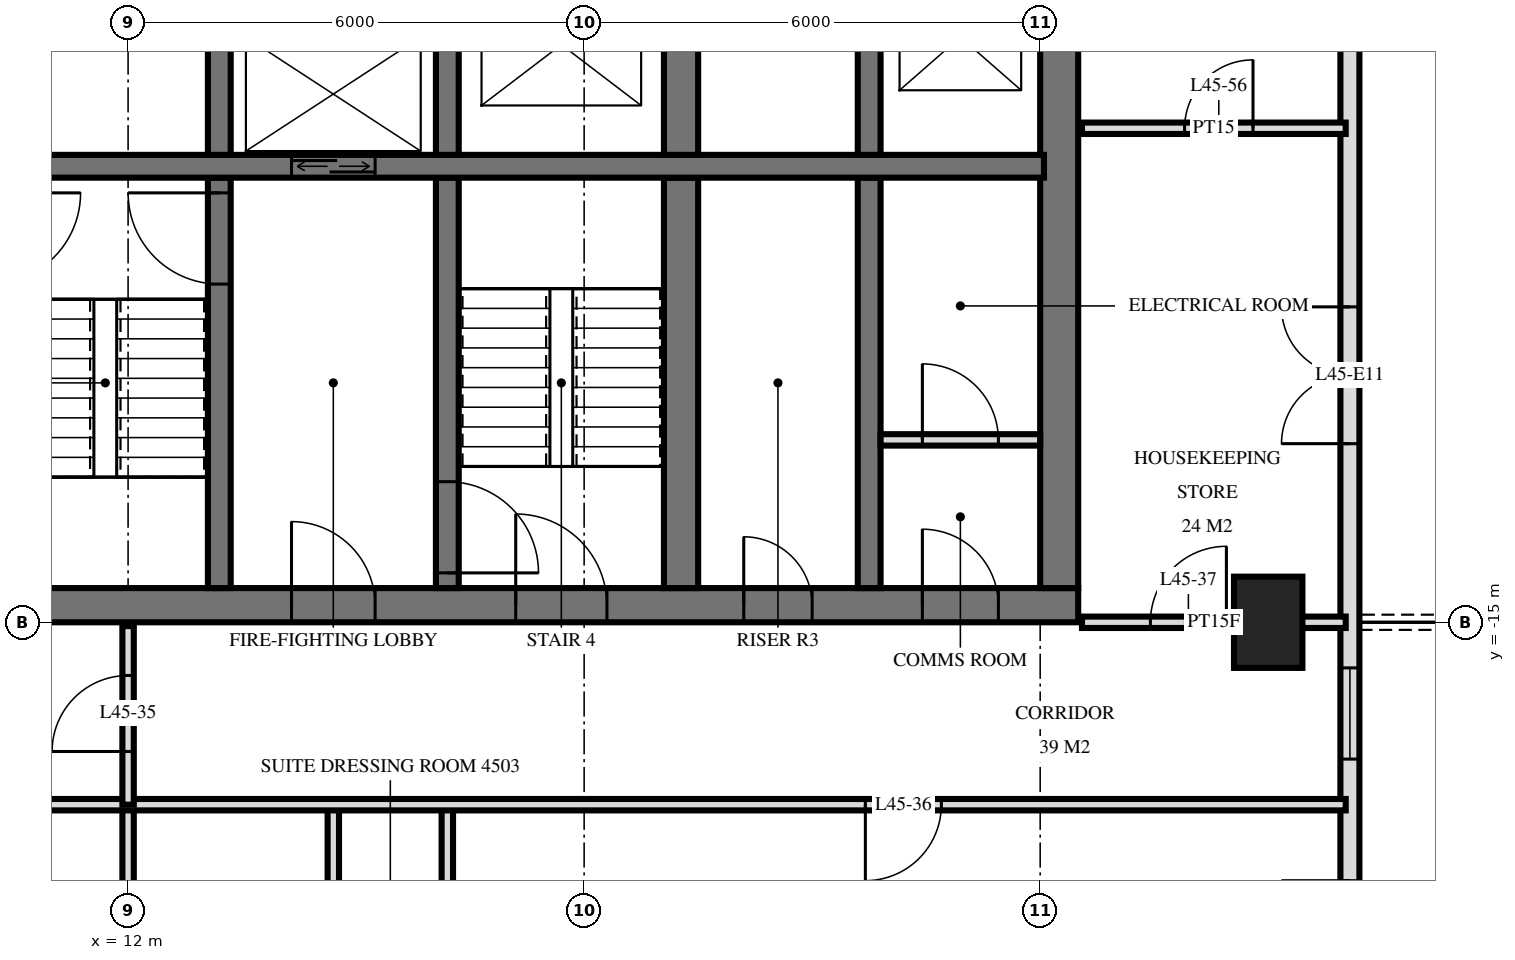
"""IFC4 building model, lengths in metres.
Left out: names, types, materials, properties, quantities, classifications, styles, units other than length and angle.
Written with IfcOpenShell. Run it as: python <this file> out.ifc"""

import sys

from ifc_helpers import new_model, si_unit, direction, frame, frame_2d, origin, origin_2d, place, context, subcontext, project, spatial, rectangle, extrude, element, fill, save


model = new_model("IFC4")
c1 = context("Model", 3, precision=1e-05, world=origin(), true_north=direction((0.0, 1.0)))
c2 = subcontext(c1, "Body", "Model", "MODEL_VIEW")
j1 = project(units=[si_unit("LENGTHUNIT", "METRE"), si_unit("PLANEANGLEUNIT", "RADIAN")], contexts=[c1])
p1 = place(None, origin())
s1 = spatial("IfcSite", under=j1, at=p1, CompositionType="ELEMENT")
p2 = place(p1, origin())
s2 = spatial("IfcBuilding", under=s1, at=p2, CompositionType="ELEMENT")
p3 = place(p2, frame((0.0, 0.0, 174.0)))
s3 = spatial("IfcBuildingStorey", under=s2, at=p3, CompositionType="ELEMENT", Elevation=174.0)
p4 = place(p3, frame((27.0, -15.0, 0.0), z_axis=(0.0, 0.0, 1.0), x_axis=(0.0, 1.0, 0.0)))
e1 = element("IfcColumn", 1, at=p4, inside=s3, PredefinedType="COLUMN", context=c2, shape_type="SweptSolid", body=[
    extrude(rectangle(XDim=1.2, YDim=0.9, at=origin_2d()), origin(), (0.0, 0.0, 1.0), 3.6),
])
p5 = place(p3, frame((10.0, -14.775, 0.0), z_axis=(0.0, 0.0, 1.0), x_axis=(1.0, 0.0, 0.0)))
e2 = element("IfcWall", 2, at=p5, inside=s3, PredefinedType="SHEAR", context=c2, shape_type="SweptSolid", body=[
    extrude(rectangle(XDim=14.5, YDim=0.45, at=frame_2d((7.25, 0.0))), origin(), (0.0, 0.0, 1.0), 3.6),
])
p6 = place(p5, frame((7.1, 0.0, 0.0)))
e3 = element("IfcOpeningElement", 3, at=p6, cuts=e2, PredefinedType="OPENING", context=c2, shape_type="SweptSolid", body=[
    extrude(rectangle(XDim=1.2, YDim=2.1, at=frame_2d((0.6, 1.05))), frame((0.0, 0.235, 0.0), z_axis=(0.0, -1.0, 0.0), x_axis=(1.0, 0.0, 0.0)), (0.0, 0.0, 1.0), 0.47),
])
p7 = place(p5, frame((4.15, 0.0, 0.0)))
e4 = element("IfcOpeningElement", 4, at=p7, cuts=e2, PredefinedType="OPENING", context=c2, shape_type="SweptSolid", body=[
    extrude(rectangle(XDim=1.1, YDim=2.1, at=frame_2d((0.55, 1.05))), frame((0.0, 0.235, 0.0), z_axis=(0.0, -1.0, 0.0), x_axis=(1.0, 0.0, 0.0)), (0.0, 0.0, 1.0), 0.47),
])
p8 = place(p5, frame((10.1, 0.0, 0.0)))
e5 = element("IfcOpeningElement", 5, at=p8, cuts=e2, PredefinedType="OPENING", context=c2, shape_type="SweptSolid", body=[
    extrude(rectangle(XDim=0.9, YDim=2.1, at=frame_2d((0.45, 1.05))), frame((0.0, 0.235, 0.0), z_axis=(0.0, -1.0, 0.0), x_axis=(1.0, 0.0, 0.0)), (0.0, 0.0, 1.0), 0.47),
])
p9 = place(p5, frame((12.45, 0.0, 0.0)))
e6 = element("IfcOpeningElement", 6, at=p9, cuts=e2, PredefinedType="OPENING", context=c2, shape_type="SweptSolid", body=[
    extrude(rectangle(XDim=1.0, YDim=2.1, at=frame_2d((0.5, 1.05))), frame((0.0, 0.235, 0.0), z_axis=(0.0, -1.0, 0.0), x_axis=(1.0, 0.0, 0.0)), (0.0, 0.0, 1.0), 0.47),
])
p10 = place(p3, frame((24.25, -14.55, 0.0), z_axis=(0.0, 0.0, 1.0), x_axis=(0.0, 1.0, 0.0)))
e7 = element("IfcWall", 7, at=p10, inside=s3, PredefinedType="SHEAR", context=c2, shape_type="SweptSolid", body=[
    extrude(rectangle(XDim=14.1, YDim=0.5, at=frame_2d((7.05, 0.0))), origin(), (0.0, 0.0, 1.0), 3.6),
])
p11 = place(p3, frame((10.35, -9.0, 0.0), z_axis=(0.0, 0.0, 1.0), x_axis=(1.0, 0.0, 0.0)))
e8 = element("IfcWall", 8, at=p11, inside=s3, PredefinedType="SHEAR", context=c2, shape_type="SweptSolid", body=[
    extrude(rectangle(XDim=13.7, YDim=0.3, at=frame_2d((6.85, 0.0))), origin(), (0.0, 0.0, 1.0), 3.6),
])
p12 = place(p11, frame((3.8, 0.0, 0.0)))
e9 = element("IfcOpeningElement", 9, at=p12, cuts=e8, PredefinedType="OPENING", context=c2, shape_type="SweptSolid", body=[
    extrude(rectangle(XDim=1.1, YDim=2.1, at=frame_2d((0.55, 1.05))), frame((0.0, 0.16, 0.0), z_axis=(0.0, -1.0, 0.0), x_axis=(1.0, 0.0, 0.0)), (0.0, 0.0, 1.0), 0.32),
])
p13 = place(p3, frame((13.2, -8.85, 0.0), z_axis=(0.0, 0.0, 1.0), x_axis=(0.0, 1.0, 0.0)))
e10 = element("IfcWall", 10, at=p13, inside=s3, PredefinedType="SHEAR", context=c2, shape_type="SweptSolid", body=[
    extrude(rectangle(XDim=2.3, YDim=0.3, at=frame_2d((1.15, 0.0))), origin(), (0.0, 0.0, 1.0), 3.6),
])
p14 = place(p3, frame((13.2, -14.55, 0.0), z_axis=(0.0, 0.0, 1.0), x_axis=(0.0, 1.0, 0.0)))
e11 = element("IfcWall", 11, at=p14, inside=s3, PredefinedType="SHEAR", context=c2, shape_type="SweptSolid", body=[
    extrude(rectangle(XDim=5.4, YDim=0.3, at=frame_2d((2.7, 0.0))), origin(), (0.0, 0.0, 1.0), 3.6),
])
p15 = place(p14, frame((4.0, 0.0, 0.0)))
e12 = element("IfcOpeningElement", 12, at=p15, cuts=e11, PredefinedType="OPENING", context=c2, shape_type="SweptSolid", body=[
    extrude(rectangle(XDim=1.2, YDim=2.1, at=frame_2d((0.6, 1.05))), frame((0.0, 0.16, 0.0), z_axis=(0.0, -1.0, 0.0), x_axis=(1.0, 0.0, 0.0)), (0.0, 0.0, 1.0), 0.32),
])
p16 = place(p3, frame((16.2, -8.85, 0.0), z_axis=(0.0, 0.0, 1.0), x_axis=(0.0, 1.0, 0.0)))
e13 = element("IfcWall", 13, at=p16, inside=s3, PredefinedType="SHEAR", context=c2, shape_type="SweptSolid", body=[
    extrude(rectangle(XDim=2.3, YDim=0.3, at=frame_2d((1.15, 0.0))), origin(), (0.0, 0.0, 1.0), 3.6),
])
p17 = place(p3, frame((16.2, -14.55, 0.0), z_axis=(0.0, 0.0, 1.0), x_axis=(0.0, 1.0, 0.0)))
e14 = element("IfcWall", 14, at=p17, inside=s3, PredefinedType="SHEAR", context=c2, shape_type="SweptSolid", body=[
    extrude(rectangle(XDim=5.4, YDim=0.3, at=frame_2d((2.7, 0.0))), origin(), (0.0, 0.0, 1.0), 3.6),
])
p18 = place(p17, frame((0.2, 0.0, 0.0)))
e15 = element("IfcOpeningElement", 15, at=p18, cuts=e14, PredefinedType="OPENING", context=c2, shape_type="SweptSolid", body=[
    extrude(rectangle(XDim=1.2, YDim=2.1, at=frame_2d((0.6, 1.05))), frame((0.0, 0.16, 0.0), z_axis=(0.0, -1.0, 0.0), x_axis=(1.0, 0.0, 0.0)), (0.0, 0.0, 1.0), 0.32),
])
p19 = place(p3, frame((19.275, -8.85, 0.0), z_axis=(0.0, 0.0, 1.0), x_axis=(0.0, 1.0, 0.0)))
e16 = element("IfcWall", 16, at=p19, inside=s3, PredefinedType="SHEAR", context=c2, shape_type="SweptSolid", body=[
    extrude(rectangle(XDim=2.3, YDim=0.45, at=frame_2d((1.15, 0.0))), origin(), (0.0, 0.0, 1.0), 3.6),
])
p20 = place(p3, frame((19.275, -14.55, 0.0), z_axis=(0.0, 0.0, 1.0), x_axis=(0.0, 1.0, 0.0)))
e17 = element("IfcWall", 17, at=p20, inside=s3, PredefinedType="SHEAR", context=c2, shape_type="SweptSolid", body=[
    extrude(rectangle(XDim=5.4, YDim=0.45, at=frame_2d((2.7, 0.0))), origin(), (0.0, 0.0, 1.0), 3.6),
])
p21 = place(p3, frame((21.75, -8.85, 0.0), z_axis=(0.0, 0.0, 1.0), x_axis=(0.0, 1.0, 0.0)))
e18 = element("IfcWall", 18, at=p21, inside=s3, PredefinedType="SHEAR", context=c2, shape_type="SweptSolid", body=[
    extrude(rectangle(XDim=2.3, YDim=0.3, at=frame_2d((1.15, 0.0))), origin(), (0.0, 0.0, 1.0), 3.6),
])
p22 = place(p3, frame((21.75, -14.55, 0.0), z_axis=(0.0, 0.0, 1.0), x_axis=(0.0, 1.0, 0.0)))
e19 = element("IfcWall", 19, at=p22, inside=s3, PredefinedType="SHEAR", context=c2, shape_type="SweptSolid", body=[
    extrude(rectangle(XDim=5.4, YDim=0.3, at=frame_2d((2.7, 0.0))), origin(), (0.0, 0.0, 1.0), 3.6),
])
p23 = place(p3, frame((28.075, -29.275, 0.0), z_axis=(0.0, 0.0, 1.0), x_axis=(0.0, 1.0, 0.0)))
e20 = element("IfcWall", 20, at=p23, inside=s3, PredefinedType="SOLIDWALL", context=c2, shape_type="SweptSolid", body=[
    extrude(rectangle(XDim=25.951, YDim=0.25, at=frame_2d((12.975, 0.0))), origin(), (0.0, 0.0, 1.0), 3.3),
])
p24 = place(p23, frame((0.575, 0.0, 0.0)))
e21 = element("IfcOpeningElement", 21, at=p24, cuts=e20, PredefinedType="OPENING", context=c2, shape_type="SweptSolid", body=[
    extrude(rectangle(XDim=1.8, YDim=2.4, at=frame_2d((0.9, 1.2))), frame((0.0, 0.135, 0.0), z_axis=(0.0, -1.0, 0.0), x_axis=(1.0, 0.0, 0.0)), (0.0, 0.0, 1.0), 0.27),
])
p25 = place(p23, frame((3.325, 0.0, 0.3)))
e22 = element("IfcOpeningElement", 22, at=p25, cuts=e20, PredefinedType="OPENING", context=c2, shape_type="SweptSolid", body=[
    extrude(rectangle(XDim=1.8, YDim=2.1, at=frame_2d((0.9, 1.05))), frame((0.0, 0.135, 0.0), z_axis=(0.0, -1.0, 0.0), x_axis=(1.0, 0.0, 0.0)), (0.0, 0.0, 1.0), 0.27),
])
p26 = place(p23, frame((9.075, 0.0, 0.0)))
e23 = element("IfcOpeningElement", 23, at=p26, cuts=e20, PredefinedType="OPENING", context=c2, shape_type="SweptSolid", body=[
    extrude(rectangle(XDim=1.8, YDim=2.4, at=frame_2d((0.9, 1.2))), frame((0.0, 0.135, 0.0), z_axis=(0.0, -1.0, 0.0), x_axis=(1.0, 0.0, 0.0)), (0.0, 0.0, 1.0), 0.27),
])
p27 = place(p23, frame((12.475, 0.0, 0.3)))
e24 = element("IfcOpeningElement", 24, at=p27, cuts=e20, PredefinedType="OPENING", context=c2, shape_type="SweptSolid", body=[
    extrude(rectangle(XDim=1.2, YDim=2.1, at=frame_2d((0.6, 1.05))), frame((0.0, 0.135, 0.0), z_axis=(0.0, -1.0, 0.0), x_axis=(1.0, 0.0, 0.0)), (0.0, 0.0, 1.0), 0.27),
])
p28 = place(p23, frame((16.625, 0.0, 0.0)))
e25 = element("IfcOpeningElement", 25, at=p28, cuts=e20, PredefinedType="OPENING", context=c2, shape_type="SweptSolid", body=[
    extrude(rectangle(XDim=1.8, YDim=2.4, at=frame_2d((0.9, 1.2))), frame((0.0, 0.135, 0.0), z_axis=(0.0, -1.0, 0.0), x_axis=(1.0, 0.0, 0.0)), (0.0, 0.0, 1.0), 0.27),
])
p29 = place(p3, frame((21.9, -12.6, 0.0), z_axis=(0.0, 0.0, 1.0), x_axis=(1.0, 0.0, 0.0)))
e26 = element("IfcWall", 26, at=p29, inside=s3, PredefinedType="PARTITIONING", context=c2, shape_type="SweptSolid", body=[
    extrude(rectangle(XDim=2.1, YDim=0.15, at=frame_2d((1.05, 0.0))), origin(), (0.0, 0.0, 1.0), 3.3),
])
p30 = place(p29, frame((0.55, 0.0, 0.0)))
e27 = element("IfcOpeningElement", 27, at=p30, cuts=e26, PredefinedType="OPENING", context=c2, shape_type="SweptSolid", body=[
    extrude(rectangle(XDim=1.0, YDim=2.1, at=frame_2d((0.5, 1.05))), frame((0.0, 0.085, 0.0), z_axis=(0.0, -1.0, 0.0), x_axis=(1.0, 0.0, 0.0)), (0.0, 0.0, 1.0), 0.17),
])
p31 = place(p3, frame((16.2, -21.6, 0.0), z_axis=(0.0, 0.0, 1.0), x_axis=(0.0, 1.0, 0.0)))
e28 = element("IfcWall", 28, at=p31, inside=s3, PredefinedType="PARTITIONING", context=c2, shape_type="SweptSolid", body=[
    extrude(rectangle(XDim=4.2, YDim=0.15, at=frame_2d((2.1, 0.0))), origin(), (0.0, 0.0, 1.0), 3.32),
])
p32 = place(p31, frame((1.65, 0.0, 0.0)))
e29 = element("IfcOpeningElement", 29, at=p32, cuts=e28, PredefinedType="OPENING", context=c2, shape_type="SweptSolid", body=[
    extrude(rectangle(XDim=0.9, YDim=2.1, at=frame_2d((0.45, 1.05))), frame((0.0, 0.085, 0.0), z_axis=(0.0, -1.0, 0.0), x_axis=(1.0, 0.0, 0.0)), (0.0, 0.0, 1.0), 0.17),
])
p33 = place(p3, frame((14.7, -21.6, 0.0), z_axis=(0.0, 0.0, 1.0), x_axis=(0.0, 1.0, 0.0)))
e30 = element("IfcWall", 30, at=p33, inside=s3, PredefinedType="PARTITIONING", context=c2, shape_type="SweptSolid", body=[
    extrude(rectangle(XDim=4.2, YDim=0.15, at=frame_2d((2.1, 0.0))), origin(), (0.0, 0.0, 1.0), 3.32),
])
p34 = place(p3, frame((12.0, -17.4, 0.0), z_axis=(0.0, 0.0, 1.0), x_axis=(0.0, 1.0, 0.0)))
e31 = element("IfcWall", 31, at=p34, inside=s3, PredefinedType="PARTITIONING", context=c2, shape_type="SweptSolid", body=[
    extrude(rectangle(XDim=2.35, YDim=0.15, at=frame_2d((1.175, 0.0))), origin(), (0.0, 0.0, 1.0), 3.32),
])
p35 = place(p34, frame((0.7, 0.0, 0.0)))
e32 = element("IfcOpeningElement", 32, at=p35, cuts=e31, PredefinedType="OPENING", context=c2, shape_type="SweptSolid", body=[
    extrude(rectangle(XDim=1.0, YDim=2.1, at=frame_2d((0.5, 1.05))), frame((0.0, 0.085, 0.0), z_axis=(0.0, -1.0, 0.0), x_axis=(1.0, 0.0, 0.0)), (0.0, 0.0, 1.0), 0.17),
])
p36 = place(p3, frame((12.0, -33.62, 0.0), z_axis=(0.0, 0.0, 1.0), x_axis=(0.0, 1.0, 0.0)))
e33 = element("IfcWall", 33, at=p36, inside=s3, PredefinedType="PARTITIONING", context=c2, shape_type="SweptSolid", body=[
    extrude(rectangle(XDim=16.22, YDim=0.15, at=frame_2d((8.11, 0.0))), origin(), (0.0, 0.0, 1.0), 3.32),
])
p37 = place(p3, frame((-28.02, -17.4, 0.0), z_axis=(0.0, 0.0, 1.0), x_axis=(1.0, 0.0, 0.0)))
e34 = element("IfcWall", 34, at=p37, inside=s3, PredefinedType="PARTITIONING", context=c2, shape_type="SweptSolid", body=[
    extrude(rectangle(XDim=56.04, YDim=0.15, at=frame_2d((28.02, 0.0))), origin(), (0.0, 0.0, 1.0), 3.32),
])
p38 = place(p37, frame((10.42, 0.0, 0.0)))
e35 = element("IfcOpeningElement", 35, at=p38, cuts=e34, PredefinedType="OPENING", context=c2, shape_type="SweptSolid", body=[
    extrude(rectangle(XDim=1.0, YDim=2.1, at=frame_2d((0.5, 1.05))), frame((0.0, 0.085, 0.0), z_axis=(0.0, -1.0, 0.0), x_axis=(1.0, 0.0, 0.0)), (0.0, 0.0, 1.0), 0.17),
])
p39 = place(p37, frame((2.32, 0.0, 0.0)))
e36 = element("IfcOpeningElement", 36, at=p39, cuts=e34, PredefinedType="OPENING", context=c2, shape_type="SweptSolid", body=[
    extrude(rectangle(XDim=1.0, YDim=2.1, at=frame_2d((0.5, 1.05))), frame((0.0, 0.085, 0.0), z_axis=(0.0, -1.0, 0.0), x_axis=(1.0, 0.0, 0.0)), (0.0, 0.0, 1.0), 0.17),
])
p40 = place(p37, frame((49.72, 0.0, 0.0)))
e37 = element("IfcOpeningElement", 37, at=p40, cuts=e34, PredefinedType="OPENING", context=c2, shape_type="SweptSolid", body=[
    extrude(rectangle(XDim=1.0, YDim=2.1, at=frame_2d((0.5, 1.05))), frame((0.0, 0.085, 0.0), z_axis=(0.0, -1.0, 0.0), x_axis=(1.0, 0.0, 0.0)), (0.0, 0.0, 1.0), 0.17),
])
p41 = place(p37, frame((23.02, 0.0, 0.0)))
e38 = element("IfcOpeningElement", 38, at=p41, cuts=e34, PredefinedType="OPENING", context=c2, shape_type="SweptSolid", body=[
    extrude(rectangle(XDim=1.0, YDim=2.1, at=frame_2d((0.5, 1.05))), frame((0.0, 0.085, 0.0), z_axis=(0.0, -1.0, 0.0), x_axis=(1.0, 0.0, 0.0)), (0.0, 0.0, 1.0), 0.17),
])
p42 = place(p37, frame((35.02, 0.0, 0.0)))
e39 = element("IfcOpeningElement", 39, at=p42, cuts=e34, PredefinedType="OPENING", context=c2, shape_type="SweptSolid", body=[
    extrude(rectangle(XDim=1.0, YDim=2.1, at=frame_2d((0.5, 1.05))), frame((0.0, 0.085, 0.0), z_axis=(0.0, -1.0, 0.0), x_axis=(1.0, 0.0, 0.0)), (0.0, 0.0, 1.0), 0.17),
])
p43 = place(p3, frame((24.55, -15.0, 0.0), z_axis=(0.0, 0.0, 1.0), x_axis=(1.0, 0.0, 0.0)))
e40 = element("IfcWall", 40, at=p43, inside=s3, PredefinedType="PARTITIONING", context=c2, shape_type="SweptSolid", body=[
    extrude(rectangle(XDim=3.47, YDim=0.15, at=frame_2d((1.735, 0.0))), origin(), (0.0, 0.0, 1.0), 3.32),
])
p44 = place(p43, frame((0.9, 0.0, 0.0)))
e41 = element("IfcOpeningElement", 41, at=p44, cuts=e40, PredefinedType="OPENING", context=c2, shape_type="SweptSolid", body=[
    extrude(rectangle(XDim=1.0, YDim=2.1, at=frame_2d((0.5, 1.05))), frame((0.0, 0.085, 0.0), z_axis=(0.0, -1.0, 0.0), x_axis=(1.0, 0.0, 0.0)), (0.0, 0.0, 1.0), 0.17),
])
p45 = place(p3, frame((24.55, -8.5, 0.0), z_axis=(0.0, 0.0, 1.0), x_axis=(1.0, 0.0, 0.0)))
e42 = element("IfcWall", 42, at=p45, inside=s3, PredefinedType="PARTITIONING", context=c2, shape_type="SweptSolid", body=[
    extrude(rectangle(XDim=3.47, YDim=0.15, at=frame_2d((1.735, 0.0))), origin(), (0.0, 0.0, 1.0), 3.32),
])
p46 = place(p45, frame((1.35, 0.0, 0.0)))
e43 = element("IfcOpeningElement", 43, at=p46, cuts=e42, PredefinedType="OPENING", context=c2, shape_type="SweptSolid", body=[
    extrude(rectangle(XDim=0.9, YDim=2.1, at=frame_2d((0.45, 1.05))), frame((0.0, 0.085, 0.0), z_axis=(0.0, -1.0, 0.0), x_axis=(1.0, 0.0, 0.0)), (0.0, 0.0, 1.0), 0.17),
])
p47 = place(p27, origin())
e44 = element("IfcWindow", 44, at=p47, inside=s3, PartitioningType="SINGLE_PANEL", PredefinedType="WINDOW", context=c2, shape_type="SweptSolid", body=[
    extrude(rectangle(XDim=1.2, YDim=2.1, at=frame_2d((0.6, 1.05))), frame((0.0, 0.03, 0.0), z_axis=(0.0, -1.0, 0.0), x_axis=(1.0, 0.0, 0.0)), (0.0, 0.0, 1.0), 0.06),
])
fill(e24, e44)
p48 = place(p28, origin())
e45 = element("IfcDoor", 45, at=p48, inside=s3, OperationType="DOUBLE_DOOR_SINGLE_SWING", PredefinedType="DOOR", context=c2, shape_type="SweptSolid", body=[
    extrude(rectangle(XDim=1.8, YDim=2.4, at=frame_2d((0.9, 1.2))), frame((0.0, 0.025, 0.0), z_axis=(0.0, -1.0, 0.0), x_axis=(1.0, 0.0, 0.0)), (0.0, 0.0, 1.0), 0.05),
])
fill(e25, e45)
p49 = place(p12, origin())
e46 = element("IfcDoor", 46, at=p49, inside=s3, OperationType="DOUBLE_DOOR_SLIDING", PredefinedType="USERDEFINED", context=c2, shape_type="SweptSolid", body=[
    extrude(rectangle(XDim=1.1, YDim=2.1, at=frame_2d((0.55, 1.05))), frame((0.0, 0.025, 0.0), z_axis=(0.0, -1.0, 0.0), x_axis=(1.0, 0.0, 0.0)), (0.0, 0.0, 1.0), 0.05),
])
fill(e9, e46)
p50 = place(p6, origin())
e47 = element("IfcDoor", 47, at=p50, inside=s3, OperationType="SINGLE_SWING_RIGHT", PredefinedType="DOOR", context=c2, shape_type="SweptSolid", body=[
    extrude(rectangle(XDim=1.2, YDim=2.1, at=frame_2d((0.6, 1.05))), frame((0.0, 0.025, 0.0), z_axis=(0.0, -1.0, 0.0), x_axis=(1.0, 0.0, 0.0)), (0.0, 0.0, 1.0), 0.05),
])
fill(e3, e47)
p51 = place(p7, origin())
e48 = element("IfcDoor", 48, at=p51, inside=s3, OperationType="SINGLE_SWING_RIGHT", PredefinedType="DOOR", context=c2, shape_type="SweptSolid", body=[
    extrude(rectangle(XDim=1.1, YDim=2.1, at=frame_2d((0.55, 1.05))), frame((0.0, 0.025, 0.0), z_axis=(0.0, -1.0, 0.0), x_axis=(1.0, 0.0, 0.0)), (0.0, 0.0, 1.0), 0.05),
])
fill(e4, e48)
p52 = place(p8, origin())
e49 = element("IfcDoor", 49, at=p52, inside=s3, OperationType="SINGLE_SWING_RIGHT", PredefinedType="DOOR", context=c2, shape_type="SweptSolid", body=[
    extrude(rectangle(XDim=0.9, YDim=2.1, at=frame_2d((0.45, 1.05))), frame((0.0, 0.025, 0.0), z_axis=(0.0, -1.0, 0.0), x_axis=(1.0, 0.0, 0.0)), (0.0, 0.0, 1.0), 0.05),
])
fill(e5, e49)
p53 = place(p9, origin())
e50 = element("IfcDoor", 50, at=p53, inside=s3, OperationType="SINGLE_SWING_RIGHT", PredefinedType="DOOR", context=c2, shape_type="SweptSolid", body=[
    extrude(rectangle(XDim=1.0, YDim=2.1, at=frame_2d((0.5, 1.05))), frame((0.0, 0.025, 0.0), z_axis=(0.0, -1.0, 0.0), x_axis=(1.0, 0.0, 0.0)), (0.0, 0.0, 1.0), 0.05),
])
fill(e6, e50)
p54 = place(p15, origin())
e51 = element("IfcDoor", 51, at=p54, inside=s3, OperationType="SINGLE_SWING_LEFT", PredefinedType="DOOR", context=c2, shape_type="SweptSolid", body=[
    extrude(rectangle(XDim=1.2, YDim=2.1, at=frame_2d((0.6, 1.05))), frame((0.0, 0.025, 0.0), z_axis=(0.0, -1.0, 0.0), x_axis=(1.0, 0.0, 0.0)), (0.0, 0.0, 1.0), 0.05),
])
fill(e12, e51)
p55 = place(p18, frame((0.6, 0.0, 0.0), z_axis=(0.0, 0.0, 1.0), x_axis=(-1.0, 0.0, 0.0)))
e52 = element("IfcDoor", 52, at=p55, inside=s3, OperationType="SINGLE_SWING_LEFT", PredefinedType="DOOR", context=c2, shape_type="SweptSolid", body=[
    extrude(rectangle(XDim=1.2, YDim=2.1, at=frame_2d((0.0, 1.05))), frame((0.0, -0.025, 0.0), z_axis=(0.0, 1.0, 0.0), x_axis=(-1.0, 0.0, 0.0)), (0.0, 0.0, 1.0), 0.05),
])
fill(e15, e52)
p56 = place(p30, origin())
e53 = element("IfcDoor", 53, at=p56, inside=s3, OperationType="SINGLE_SWING_RIGHT", PredefinedType="DOOR", context=c2, shape_type="SweptSolid", body=[
    extrude(rectangle(XDim=1.0, YDim=2.1, at=frame_2d((0.5, 1.05))), frame((0.0, 0.025, 0.0), z_axis=(0.0, -1.0, 0.0), x_axis=(1.0, 0.0, 0.0)), (0.0, 0.0, 1.0), 0.05),
])
fill(e27, e53)
p57 = place(p35, origin())
e54 = element("IfcDoor", 54, at=p57, inside=s3, OperationType="SINGLE_SWING_RIGHT", PredefinedType="DOOR", context=c2, shape_type="SweptSolid", body=[
    extrude(rectangle(XDim=1.0, YDim=2.1, at=frame_2d((0.5, 1.05))), frame((0.0, 0.025, 0.0), z_axis=(0.0, -1.0, 0.0), x_axis=(1.0, 0.0, 0.0)), (0.0, 0.0, 1.0), 0.05),
])
fill(e32, e54)
p58 = place(p40, frame((0.5, 0.0, 0.0), z_axis=(0.0, 0.0, 1.0), x_axis=(-1.0, 0.0, 0.0)))
e55 = element("IfcDoor", 55, at=p58, inside=s3, OperationType="SINGLE_SWING_LEFT", PredefinedType="DOOR", context=c2, shape_type="SweptSolid", body=[
    extrude(rectangle(XDim=1.0, YDim=2.1, at=frame_2d((0.0, 1.05))), frame((0.0, -0.025, 0.0), z_axis=(0.0, 1.0, 0.0), x_axis=(-1.0, 0.0, 0.0)), (0.0, 0.0, 1.0), 0.05),
])
fill(e37, e55)
p59 = place(p44, origin())
e56 = element("IfcDoor", 56, at=p59, inside=s3, OperationType="SINGLE_SWING_LEFT", PredefinedType="DOOR", context=c2, shape_type="SweptSolid", body=[
    extrude(rectangle(XDim=1.0, YDim=2.1, at=frame_2d((0.5, 1.05))), frame((0.0, 0.025, 0.0), z_axis=(0.0, -1.0, 0.0), x_axis=(1.0, 0.0, 0.0)), (0.0, 0.0, 1.0), 0.05),
])
fill(e41, e56)
p60 = place(p46, origin())
e57 = element("IfcDoor", 57, at=p60, inside=s3, OperationType="SINGLE_SWING_LEFT", PredefinedType="DOOR", context=c2, shape_type="SweptSolid", body=[
    extrude(rectangle(XDim=0.9, YDim=2.1, at=frame_2d((0.45, 1.05))), frame((0.0, 0.025, 0.0), z_axis=(0.0, -1.0, 0.0), x_axis=(1.0, 0.0, 0.0)), (0.0, 0.0, 1.0), 0.05),
])
fill(e43, e57)
save(model, sys.argv[1])
